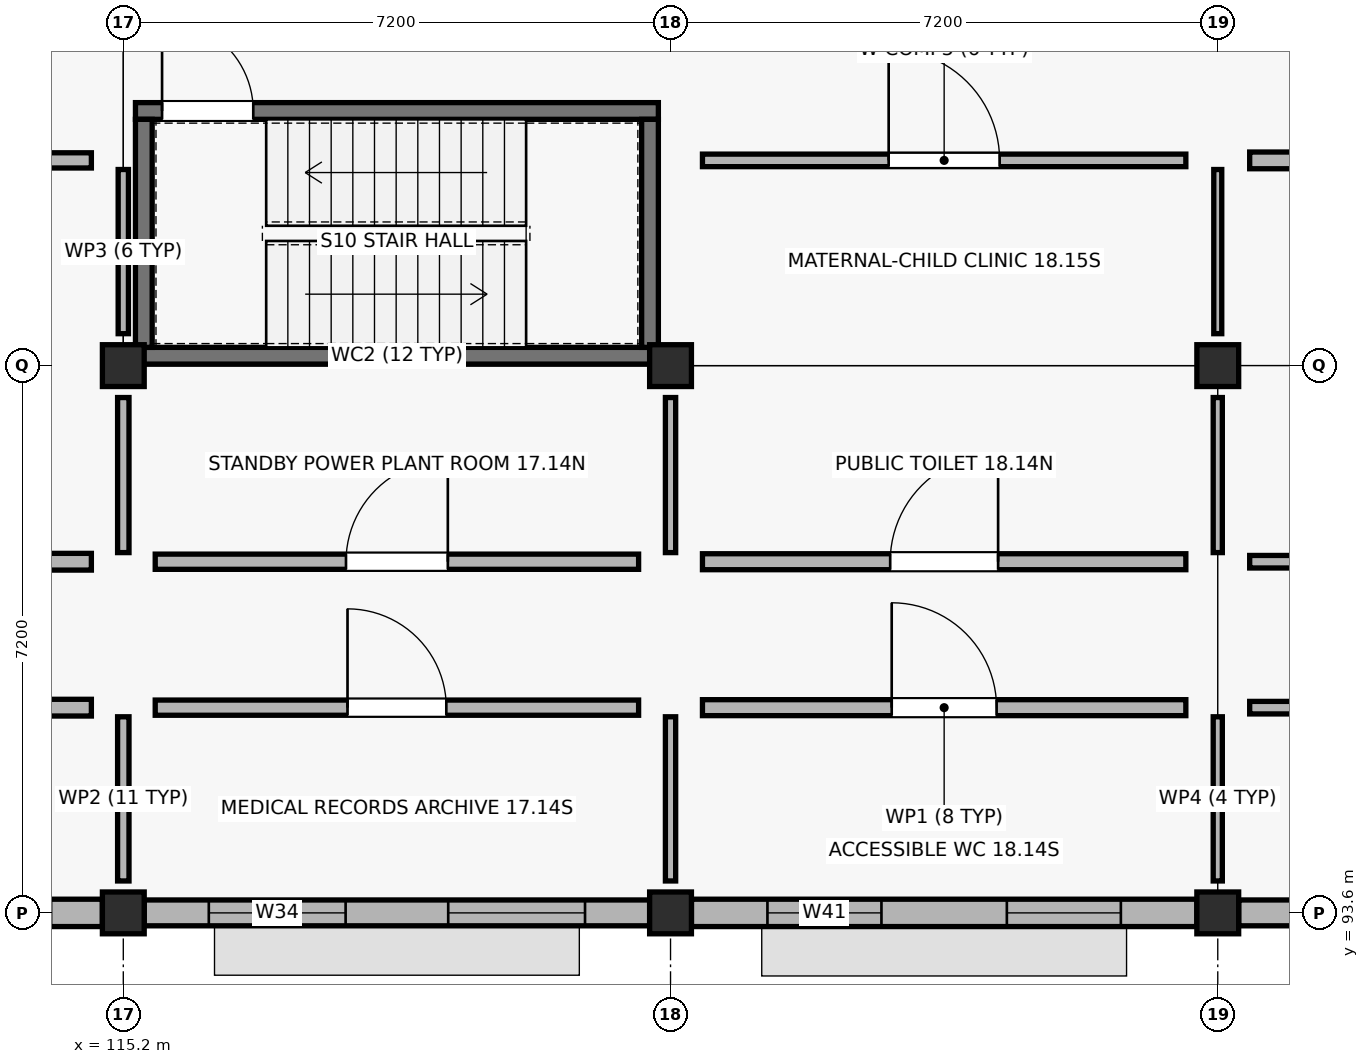
"""IFC4 building model, lengths in metres.
Left out: names, types, materials, properties, quantities, classifications, styles, units other than length and angle.
Written with IfcOpenShell. Run it as: python <this file> out.ifc"""

import sys

from ifc_helpers import new_model, si_unit, direction, frame, frame_2d, origin, origin_2d, place, context, subcontext, project, spatial, rectangle, extrude, element, fill, save


model = new_model("IFC4")
c1 = context("Model", 3, precision=1e-05, world=origin(), true_north=direction((0.0, 1.0)))
c2 = subcontext(c1, "Body", "Model", "MODEL_VIEW")
j1 = project(units=[si_unit("LENGTHUNIT", "METRE"), si_unit("PLANEANGLEUNIT", "RADIAN")], contexts=[c1])
p1 = place(None, origin())
s1 = spatial("IfcSite", under=j1, at=p1, CompositionType="ELEMENT")
p2 = place(p1, origin())
s2 = spatial("IfcBuilding", under=s1, at=p2, CompositionType="ELEMENT")
p3 = place(p2, origin())
s3 = spatial("IfcBuildingStorey", under=s2, at=p3, CompositionType="ELEMENT", Elevation=0.0)
for number, where, z_axis, x_axis in (
    (1, (115.2, 93.6, -0.25), (0.0, 0.0, 1.0), (1.0, 0.0, 0.0)),
    (2, (115.2, 100.8, -0.25), (0.0, 0.0, 1.0), (1.0, 0.0, 0.0)),
    (3, (122.4, 93.6, -0.25), (0.0, 0.0, 1.0), (1.0, 0.0, 0.0)),
    (4, (122.4, 100.8, -0.25), (0.0, 0.0, 1.0), (1.0, 0.0, 0.0)),
    (5, (129.6, 93.6, -0.25), (0.0, 0.0, 1.0), (1.0, 0.0, 0.0)),
    (6, (129.6, 100.8, -0.25), (0.0, 0.0, 1.0), (1.0, 0.0, 0.0)),
):
    element("IfcColumn", number, at=place(p3, frame(where, z_axis=z_axis, x_axis=x_axis)), inside=s3, PredefinedType="COLUMN", context=c2, shape_type="SweptSolid", body=[
        extrude(rectangle(XDim=0.55, YDim=0.55, at=origin_2d()), origin(), (0.0, 0.0, 1.0), 4.75),
    ])
p4 = place(p3, frame((108.275, 93.6, 0.0), z_axis=(0.0, 0.0, 1.0), x_axis=(1.0, 0.0, 0.0)))
e7 = element("IfcWall", 7, at=p4, inside=s3, PredefinedType="SOLIDWALL", context=c2, shape_type="SweptSolid", body=[
    extrude(rectangle(XDim=6.65, YDim=0.36, at=frame_2d((3.325, 0.0))), origin(), (0.0, 0.0, 1.0), 3.47),
])
p5 = place(p4, frame((0.675, 0.0, 0.9)))
e8 = element("IfcOpeningElement", 8, at=p5, cuts=e7, PredefinedType="OPENING", context=c2, shape_type="SweptSolid", body=[
    extrude(rectangle(XDim=2.15, YDim=1.5, at=frame_2d((1.075, 0.75))), frame((0.0, 0.19, 0.0), z_axis=(0.0, -1.0, 0.0), x_axis=(1.0, 0.0, 0.0)), (0.0, 0.0, 1.0), 0.38),
])
p6 = place(p4, frame((3.825, 0.0, 0.9)))
e9 = element("IfcOpeningElement", 9, at=p6, cuts=e7, PredefinedType="OPENING", context=c2, shape_type="SweptSolid", body=[
    extrude(rectangle(XDim=2.15, YDim=1.5, at=frame_2d((1.075, 0.75))), frame((0.0, 0.19, 0.0), z_axis=(0.0, -1.0, 0.0), x_axis=(1.0, 0.0, 0.0)), (0.0, 0.0, 1.0), 0.38),
])
p7 = place(p3, frame((115.475, 93.6, 0.0), z_axis=(0.0, 0.0, 1.0), x_axis=(1.0, 0.0, 0.0)))
e10 = element("IfcWall", 10, at=p7, inside=s3, PredefinedType="SOLIDWALL", context=c2, shape_type="SweptSolid", body=[
    extrude(rectangle(XDim=6.65, YDim=0.34, at=frame_2d((3.325, 0.0))), origin(), (0.0, 0.0, 1.0), 3.47),
])
p8 = place(p7, frame((0.85, 0.0, 0.9)))
e11 = element("IfcOpeningElement", 11, at=p8, cuts=e10, PredefinedType="OPENING", context=c2, shape_type="SweptSolid", body=[
    extrude(rectangle(XDim=1.8, YDim=1.62, at=frame_2d((0.9, 0.81))), frame((0.0, 0.18, 0.0), z_axis=(0.0, -1.0, 0.0), x_axis=(1.0, 0.0, 0.0)), (0.0, 0.0, 1.0), 0.36),
])
p9 = place(p7, frame((4.0, 0.0, 0.9)))
e12 = element("IfcOpeningElement", 12, at=p9, cuts=e10, PredefinedType="OPENING", context=c2, shape_type="SweptSolid", body=[
    extrude(rectangle(XDim=1.8, YDim=1.62, at=frame_2d((0.9, 0.81))), frame((0.0, 0.18, 0.0), z_axis=(0.0, -1.0, 0.0), x_axis=(1.0, 0.0, 0.0)), (0.0, 0.0, 1.0), 0.36),
])
p10 = place(p3, frame((122.675, 93.6, 0.0), z_axis=(0.0, 0.0, 1.0), x_axis=(1.0, 0.0, 0.0)))
e13 = element("IfcWall", 13, at=p10, inside=s3, PredefinedType="SOLIDWALL", context=c2, shape_type="SweptSolid", body=[
    extrude(rectangle(XDim=6.65, YDim=0.36, at=frame_2d((3.325, 0.0))), origin(), (0.0, 0.0, 1.0), 3.47),
])
p11 = place(p10, frame((1.0, 0.0, 0.9)))
e14 = element("IfcOpeningElement", 14, at=p11, cuts=e13, PredefinedType="OPENING", context=c2, shape_type="SweptSolid", body=[
    extrude(rectangle(XDim=1.5, YDim=1.75, at=frame_2d((0.75, 0.875))), frame((0.0, 0.19, 0.0), z_axis=(0.0, -1.0, 0.0), x_axis=(1.0, 0.0, 0.0)), (0.0, 0.0, 1.0), 0.38),
])
p12 = place(p10, frame((4.15, 0.0, 0.9)))
e15 = element("IfcOpeningElement", 15, at=p12, cuts=e13, PredefinedType="OPENING", context=c2, shape_type="SweptSolid", body=[
    extrude(rectangle(XDim=1.5, YDim=1.75, at=frame_2d((0.75, 0.875))), frame((0.0, 0.19, 0.0), z_axis=(0.0, -1.0, 0.0), x_axis=(1.0, 0.0, 0.0)), (0.0, 0.0, 1.0), 0.38),
])
p13 = place(p3, frame((129.875, 93.6, 0.0), z_axis=(0.0, 0.0, 1.0), x_axis=(1.0, 0.0, 0.0)))
e16 = element("IfcWall", 16, at=p13, inside=s3, PredefinedType="SOLIDWALL", context=c2, shape_type="SweptSolid", body=[
    extrude(rectangle(XDim=6.6, YDim=0.34, at=frame_2d((3.3, 0.0))), origin(), (0.0, 0.0, 1.0), 3.47),
])
p14 = place(p13, frame((1.3, 0.0, 0.9)))
e17 = element("IfcOpeningElement", 17, at=p14, cuts=e16, PredefinedType="OPENING", context=c2, shape_type="SweptSolid", body=[
    extrude(rectangle(XDim=0.9, YDim=1.88, at=frame_2d((0.45, 0.94))), frame((0.0, 0.18, 0.0), z_axis=(0.0, -1.0, 0.0), x_axis=(1.0, 0.0, 0.0)), (0.0, 0.0, 1.0), 0.36),
])
p15 = place(p13, frame((4.4, 0.0, 0.9)))
e18 = element("IfcOpeningElement", 18, at=p15, cuts=e16, PredefinedType="OPENING", context=c2, shape_type="SweptSolid", body=[
    extrude(rectangle(XDim=0.9, YDim=1.88, at=frame_2d((0.45, 0.94))), frame((0.0, 0.18, 0.0), z_axis=(0.0, -1.0, 0.0), x_axis=(1.0, 0.0, 0.0)), (0.0, 0.0, 1.0), 0.36),
])
p16 = place(p3, frame((115.36, 100.93, -0.25), z_axis=(0.0, 0.0, 1.0), x_axis=(1.0, 0.0, 0.0)))
e19 = element("IfcWall", 19, at=p16, inside=s3, PredefinedType="SHEAR", context=c2, shape_type="SweptSolid", body=[
    extrude(rectangle(XDim=6.88, YDim=0.22, at=frame_2d((3.44, 0.0))), origin(), (0.0, 0.0, 1.0), 4.47),
])
p17 = place(p3, frame((115.36, 104.15, -0.25), z_axis=(0.0, 0.0, 1.0), x_axis=(1.0, 0.0, 0.0)))
e20 = element("IfcWall", 20, at=p17, inside=s3, PredefinedType="SHEAR", context=c2, shape_type="SweptSolid", body=[
    extrude(rectangle(XDim=6.88, YDim=0.22, at=frame_2d((3.44, 0.0))), origin(), (0.0, 0.0, 1.0), 4.47),
])
p18 = place(p17, frame((0.35, 0.0, 0.25)))
e21 = element("IfcOpeningElement", 21, at=p18, cuts=e20, PredefinedType="OPENING", context=c2, shape_type="SweptSolid", body=[
    extrude(rectangle(XDim=1.2, YDim=2.15, at=frame_2d((0.6, 1.075))), frame((0.0, 0.12, 0.0), z_axis=(0.0, -1.0, 0.0), x_axis=(1.0, 0.0, 0.0)), (0.0, 0.0, 1.0), 0.24),
])
for number, where, z_axis, x_axis in (
    (22, (115.47, 101.04, -0.25), (0.0, 0.0, 1.0), (0.0, 1.0, 0.0)),
    (23, (122.13, 101.04, -0.25), (0.0, 0.0, 1.0), (0.0, 1.0, 0.0)),
):
    element("IfcWall", number, at=place(p3, frame(where, z_axis=z_axis, x_axis=x_axis)), inside=s3, PredefinedType="SHEAR", context=c2, shape_type="SweptSolid", body=[
        extrude(rectangle(XDim=3.0, YDim=0.22, at=frame_2d((1.5, 0.0))), origin(), (0.0, 0.0, 1.0), 4.47),
    ])
p19 = place(p3, frame((108.42, 96.3, 0.0), z_axis=(0.0, 0.0, 1.0), x_axis=(1.0, 0.0, 0.0)))
e24 = element("IfcWall", 24, at=p19, inside=s3, PredefinedType="SOLIDWALL", context=c2, shape_type="SweptSolid", body=[
    extrude(rectangle(XDim=6.36, YDim=0.22, at=frame_2d((3.18, 0.0))), origin(), (0.0, 0.0, 1.0), 3.36),
])
p20 = place(p19, frame((2.61, 0.0, 0.0)))
e25 = element("IfcOpeningElement", 25, at=p20, cuts=e24, PredefinedType="OPENING", context=c2, shape_type="SweptSolid", body=[
    extrude(rectangle(XDim=1.14, YDim=2.14, at=frame_2d((0.57, 1.07))), frame((0.0, 0.12, 0.0), z_axis=(0.0, -1.0, 0.0), x_axis=(1.0, 0.0, 0.0)), (0.0, 0.0, 1.0), 0.24),
])
p21 = place(p3, frame((115.2, 94.02, 0.0), z_axis=(0.0, 0.0, 1.0), x_axis=(0.0, 1.0, 0.0)))
e26 = element("IfcWall", 26, at=p21, inside=s3, PredefinedType="PARTITIONING", context=c2, shape_type="SweptSolid", body=[
    extrude(rectangle(XDim=2.16, YDim=0.15, at=frame_2d((1.08, 0.0))), origin(), (0.0, 0.0, 1.0), 3.36),
])
p22 = place(p3, frame((108.42, 98.22, 0.0), z_axis=(0.0, 0.0, 1.0), x_axis=(1.0, 0.0, 0.0)))
e27 = element("IfcWall", 27, at=p22, inside=s3, PredefinedType="SOLIDWALL", context=c2, shape_type="SweptSolid", body=[
    extrude(rectangle(XDim=6.36, YDim=0.22, at=frame_2d((3.18, 0.0))), origin(), (0.0, 0.0, 1.0), 3.36),
])
p23 = place(p22, frame((2.59, 0.0, 0.0)))
e28 = element("IfcOpeningElement", 28, at=p23, cuts=e27, PredefinedType="OPENING", context=c2, shape_type="SweptSolid", body=[
    extrude(rectangle(XDim=1.18, YDim=2.14, at=frame_2d((0.59, 1.07))), frame((0.0, 0.12, 0.0), z_axis=(0.0, -1.0, 0.0), x_axis=(1.0, 0.0, 0.0)), (0.0, 0.0, 1.0), 0.24),
])
p24 = place(p3, frame((115.2, 98.34, 0.0), z_axis=(0.0, 0.0, 1.0), x_axis=(0.0, 1.0, 0.0)))
e29 = element("IfcWall", 29, at=p24, inside=s3, PredefinedType="PARTITIONING", context=c2, shape_type="SweptSolid", body=[
    extrude(rectangle(XDim=2.04, YDim=0.15, at=frame_2d((1.02, 0.0))), origin(), (0.0, 0.0, 1.0), 3.36),
])
p25 = place(p3, frame((108.42, 103.5, 0.0), z_axis=(0.0, 0.0, 1.0), x_axis=(1.0, 0.0, 0.0)))
e30 = element("IfcWall", 30, at=p25, inside=s3, PredefinedType="SOLIDWALL", context=c2, shape_type="SweptSolid", body=[
    extrude(rectangle(XDim=6.36, YDim=0.2, at=frame_2d((3.18, 0.0))), origin(), (0.0, 0.0, 1.0), 3.36),
])
p26 = place(p25, frame((2.57, 0.0, 0.0)))
e31 = element("IfcOpeningElement", 31, at=p26, cuts=e30, PredefinedType="OPENING", context=c2, shape_type="SweptSolid", body=[
    extrude(rectangle(XDim=1.22, YDim=2.14, at=frame_2d((0.61, 1.07))), frame((0.0, 0.11, 0.0), z_axis=(0.0, -1.0, 0.0), x_axis=(1.0, 0.0, 0.0)), (0.0, 0.0, 1.0), 0.22),
])
p27 = place(p3, frame((115.2, 101.22, 0.0), z_axis=(0.0, 0.0, 1.0), x_axis=(0.0, 1.0, 0.0)))
e32 = element("IfcWall", 32, at=p27, inside=s3, PredefinedType="PARTITIONING", context=c2, shape_type="SweptSolid", body=[
    extrude(rectangle(XDim=2.16, YDim=0.135, at=frame_2d((1.08, 0.0))), origin(), (0.0, 0.0, 1.0), 3.36),
])
p28 = place(p3, frame((115.62, 96.3, 0.0), z_axis=(0.0, 0.0, 1.0), x_axis=(1.0, 0.0, 0.0)))
e33 = element("IfcWall", 33, at=p28, inside=s3, PredefinedType="SOLIDWALL", context=c2, shape_type="SweptSolid", body=[
    extrude(rectangle(XDim=6.36, YDim=0.2, at=frame_2d((3.18, 0.0))), origin(), (0.0, 0.0, 1.0), 3.36),
])
p29 = place(p28, frame((2.53, 0.0, 0.0)))
e34 = element("IfcOpeningElement", 34, at=p29, cuts=e33, PredefinedType="OPENING", context=c2, shape_type="SweptSolid", body=[
    extrude(rectangle(XDim=1.3, YDim=2.14, at=frame_2d((0.65, 1.07))), frame((0.0, 0.11, 0.0), z_axis=(0.0, -1.0, 0.0), x_axis=(1.0, 0.0, 0.0)), (0.0, 0.0, 1.0), 0.22),
])
p30 = place(p3, frame((122.4, 94.02, 0.0), z_axis=(0.0, 0.0, 1.0), x_axis=(0.0, 1.0, 0.0)))
e35 = element("IfcWall", 35, at=p30, inside=s3, PredefinedType="PARTITIONING", context=c2, shape_type="SweptSolid", body=[
    extrude(rectangle(XDim=2.16, YDim=0.135, at=frame_2d((1.08, 0.0))), origin(), (0.0, 0.0, 1.0), 3.36),
])
p31 = place(p3, frame((115.62, 98.22, 0.0), z_axis=(0.0, 0.0, 1.0), x_axis=(1.0, 0.0, 0.0)))
e36 = element("IfcWall", 36, at=p31, inside=s3, PredefinedType="SOLIDWALL", context=c2, shape_type="SweptSolid", body=[
    extrude(rectangle(XDim=6.36, YDim=0.2, at=frame_2d((3.18, 0.0))), origin(), (0.0, 0.0, 1.0), 3.36),
])
p32 = place(p31, frame((2.51, 0.0, 0.0)))
e37 = element("IfcOpeningElement", 37, at=p32, cuts=e36, PredefinedType="OPENING", context=c2, shape_type="SweptSolid", body=[
    extrude(rectangle(XDim=1.34, YDim=2.14, at=frame_2d((0.67, 1.07))), frame((0.0, 0.11, 0.0), z_axis=(0.0, -1.0, 0.0), x_axis=(1.0, 0.0, 0.0)), (0.0, 0.0, 1.0), 0.22),
])
p33 = place(p3, frame((122.4, 98.34, 0.0), z_axis=(0.0, 0.0, 1.0), x_axis=(0.0, 1.0, 0.0)))
e38 = element("IfcWall", 38, at=p33, inside=s3, PredefinedType="PARTITIONING", context=c2, shape_type="SweptSolid", body=[
    extrude(rectangle(XDim=2.04, YDim=0.135, at=frame_2d((1.02, 0.0))), origin(), (0.0, 0.0, 1.0), 3.36),
])
p34 = place(p3, frame((122.82, 96.3, 0.0), z_axis=(0.0, 0.0, 1.0), x_axis=(1.0, 0.0, 0.0)))
e39 = element("IfcWall", 39, at=p34, inside=s3, PredefinedType="PLUMBINGWALL", context=c2, shape_type="SweptSolid", body=[
    extrude(rectangle(XDim=6.36, YDim=0.21, at=frame_2d((3.18, 0.0))), origin(), (0.0, 0.0, 1.0), 3.36),
])
p35 = place(p34, frame((2.49, 0.0, 0.0)))
e40 = element("IfcOpeningElement", 40, at=p35, cuts=e39, PredefinedType="OPENING", context=c2, shape_type="SweptSolid", body=[
    extrude(rectangle(XDim=1.38, YDim=2.14, at=frame_2d((0.69, 1.07))), frame((0.0, 0.115, 0.0), z_axis=(0.0, -1.0, 0.0), x_axis=(1.0, 0.0, 0.0)), (0.0, 0.0, 1.0), 0.23),
])
p36 = place(p3, frame((129.6, 94.02, 0.0), z_axis=(0.0, 0.0, 1.0), x_axis=(0.0, 1.0, 0.0)))
e41 = element("IfcWall", 41, at=p36, inside=s3, PredefinedType="PARTITIONING", context=c2, shape_type="SweptSolid", body=[
    extrude(rectangle(XDim=2.16, YDim=0.12, at=frame_2d((1.08, 0.0))), origin(), (0.0, 0.0, 1.0), 3.36),
])
p37 = place(p3, frame((122.82, 98.22, 0.0), z_axis=(0.0, 0.0, 1.0), x_axis=(1.0, 0.0, 0.0)))
e42 = element("IfcWall", 42, at=p37, inside=s3, PredefinedType="PLUMBINGWALL", context=c2, shape_type="SweptSolid", body=[
    extrude(rectangle(XDim=6.36, YDim=0.21, at=frame_2d((3.18, 0.0))), origin(), (0.0, 0.0, 1.0), 3.36),
])
p38 = place(p37, frame((2.47, 0.0, 0.0)))
e43 = element("IfcOpeningElement", 43, at=p38, cuts=e42, PredefinedType="OPENING", context=c2, shape_type="SweptSolid", body=[
    extrude(rectangle(XDim=1.42, YDim=2.14, at=frame_2d((0.71, 1.07))), frame((0.0, 0.115, 0.0), z_axis=(0.0, -1.0, 0.0), x_axis=(1.0, 0.0, 0.0)), (0.0, 0.0, 1.0), 0.23),
])
p39 = place(p3, frame((129.6, 98.34, 0.0), z_axis=(0.0, 0.0, 1.0), x_axis=(0.0, 1.0, 0.0)))
e44 = element("IfcWall", 44, at=p39, inside=s3, PredefinedType="PARTITIONING", context=c2, shape_type="SweptSolid", body=[
    extrude(rectangle(XDim=2.04, YDim=0.12, at=frame_2d((1.02, 0.0))), origin(), (0.0, 0.0, 1.0), 3.36),
])
p40 = place(p3, frame((122.82, 103.5, 0.0), z_axis=(0.0, 0.0, 1.0), x_axis=(1.0, 0.0, 0.0)))
e45 = element("IfcWall", 45, at=p40, inside=s3, PredefinedType="PARTITIONING", context=c2, shape_type="SweptSolid", body=[
    extrude(rectangle(XDim=6.36, YDim=0.165, at=frame_2d((3.18, 0.0))), origin(), (0.0, 0.0, 1.0), 3.36),
])
p41 = place(p40, frame((2.45, 0.0, 0.0)))
e46 = element("IfcOpeningElement", 46, at=p41, cuts=e45, PredefinedType="OPENING", context=c2, shape_type="SweptSolid", body=[
    extrude(rectangle(XDim=1.46, YDim=2.14, at=frame_2d((0.73, 1.07))), frame((0.0, 0.093, 0.0), z_axis=(0.0, -1.0, 0.0), x_axis=(1.0, 0.0, 0.0)), (0.0, 0.0, 1.0), 0.185),
])
p42 = place(p3, frame((129.6, 101.22, 0.0), z_axis=(0.0, 0.0, 1.0), x_axis=(0.0, 1.0, 0.0)))
e47 = element("IfcWall", 47, at=p42, inside=s3, PredefinedType="PARTITIONING", context=c2, shape_type="SweptSolid", body=[
    extrude(rectangle(XDim=2.16, YDim=0.105, at=frame_2d((1.08, 0.0))), origin(), (0.0, 0.0, 1.0), 3.36),
])
p43 = place(p3, frame((130.02, 96.3, 0.0), z_axis=(0.0, 0.0, 1.0), x_axis=(1.0, 0.0, 0.0)))
e48 = element("IfcWall", 48, at=p43, inside=s3, PredefinedType="PARTITIONING", context=c2, shape_type="SweptSolid", body=[
    extrude(rectangle(XDim=6.36, YDim=0.165, at=frame_2d((3.18, 0.0))), origin(), (0.0, 0.0, 1.0), 3.36),
])
p44 = place(p43, frame((2.43, 0.0, 0.0)))
e49 = element("IfcOpeningElement", 49, at=p44, cuts=e48, PredefinedType="OPENING", context=c2, shape_type="SweptSolid", body=[
    extrude(rectangle(XDim=1.5, YDim=2.14, at=frame_2d((0.75, 1.07))), frame((0.0, 0.093, 0.0), z_axis=(0.0, -1.0, 0.0), x_axis=(1.0, 0.0, 0.0)), (0.0, 0.0, 1.0), 0.185),
])
p45 = place(p3, frame((130.02, 98.22, 0.0), z_axis=(0.0, 0.0, 1.0), x_axis=(1.0, 0.0, 0.0)))
e50 = element("IfcWall", 50, at=p45, inside=s3, PredefinedType="PARTITIONING", context=c2, shape_type="SweptSolid", body=[
    extrude(rectangle(XDim=6.36, YDim=0.165, at=frame_2d((3.18, 0.0))), origin(), (0.0, 0.0, 1.0), 3.36),
])
p46 = place(p45, frame((2.73, 0.0, 0.0)))
e51 = element("IfcOpeningElement", 51, at=p46, cuts=e50, PredefinedType="OPENING", context=c2, shape_type="SweptSolid", body=[
    extrude(rectangle(XDim=0.9, YDim=2.19, at=frame_2d((0.45, 1.095))), frame((0.0, 0.093, 0.0), z_axis=(0.0, -1.0, 0.0), x_axis=(1.0, 0.0, 0.0)), (0.0, 0.0, 1.0), 0.185),
])
p47 = place(p3, frame((130.02, 103.5, 0.0), z_axis=(0.0, 0.0, 1.0), x_axis=(1.0, 0.0, 0.0)))
e52 = element("IfcWall", 52, at=p47, inside=s3, PredefinedType="SOLIDWALL", context=c2, shape_type="SweptSolid", body=[
    extrude(rectangle(XDim=6.36, YDim=0.22, at=frame_2d((3.18, 0.0))), origin(), (0.0, 0.0, 1.0), 3.36),
])
p48 = place(p47, frame((2.71, 0.0, 0.0)))
e53 = element("IfcOpeningElement", 53, at=p48, cuts=e52, PredefinedType="OPENING", context=c2, shape_type="SweptSolid", body=[
    extrude(rectangle(XDim=0.94, YDim=2.19, at=frame_2d((0.47, 1.095))), frame((0.0, 0.12, 0.0), z_axis=(0.0, -1.0, 0.0), x_axis=(1.0, 0.0, 0.0)), (0.0, 0.0, 1.0), 0.24),
])
p49 = place(p8, origin())
e54 = element("IfcWindow", 54, at=p49, inside=s3, PartitioningType="SINGLE_PANEL", PredefinedType="WINDOW", context=c2, shape_type="SweptSolid", body=[
    extrude(rectangle(XDim=1.8, YDim=1.62, at=frame_2d((0.9, 0.81))), frame((0.0, 0.03, 0.0), z_axis=(0.0, -1.0, 0.0), x_axis=(1.0, 0.0, 0.0)), (0.0, 0.0, 1.0), 0.06),
])
fill(e11, e54)
p50 = place(p9, origin())
e55 = element("IfcWindow", 55, at=p50, inside=s3, PartitioningType="SINGLE_PANEL", PredefinedType="WINDOW", context=c2, shape_type="SweptSolid", body=[
    extrude(rectangle(XDim=1.8, YDim=1.62, at=frame_2d((0.9, 0.81))), frame((0.0, 0.03, 0.0), z_axis=(0.0, -1.0, 0.0), x_axis=(1.0, 0.0, 0.0)), (0.0, 0.0, 1.0), 0.06),
])
fill(e12, e55)
p51 = place(p11, origin())
e56 = element("IfcWindow", 56, at=p51, inside=s3, PartitioningType="SINGLE_PANEL", PredefinedType="WINDOW", context=c2, shape_type="SweptSolid", body=[
    extrude(rectangle(XDim=1.5, YDim=1.75, at=frame_2d((0.75, 0.875))), frame((0.0, 0.03, 0.0), z_axis=(0.0, -1.0, 0.0), x_axis=(1.0, 0.0, 0.0)), (0.0, 0.0, 1.0), 0.06),
])
fill(e14, e56)
p52 = place(p12, origin())
e57 = element("IfcWindow", 57, at=p52, inside=s3, PartitioningType="SINGLE_PANEL", PredefinedType="WINDOW", context=c2, shape_type="SweptSolid", body=[
    extrude(rectangle(XDim=1.5, YDim=1.75, at=frame_2d((0.75, 0.875))), frame((0.0, 0.03, 0.0), z_axis=(0.0, -1.0, 0.0), x_axis=(1.0, 0.0, 0.0)), (0.0, 0.0, 1.0), 0.06),
])
fill(e15, e57)
p53 = place(p18, origin())
e58 = element("IfcDoor", 58, at=p53, inside=s3, OperationType="SINGLE_SWING_LEFT", PredefinedType="DOOR", context=c2, shape_type="SweptSolid", body=[
    extrude(rectangle(XDim=1.2, YDim=2.15, at=frame_2d((0.6, 1.075))), frame((0.0, 0.025, 0.0), z_axis=(0.0, -1.0, 0.0), x_axis=(1.0, 0.0, 0.0)), (0.0, 0.0, 1.0), 0.05),
])
fill(e21, e58)
p54 = place(p29, origin())
e59 = element("IfcDoor", 59, at=p54, inside=s3, OperationType="SINGLE_SWING_LEFT", PredefinedType="DOOR", context=c2, shape_type="SweptSolid", body=[
    extrude(rectangle(XDim=1.3, YDim=2.14, at=frame_2d((0.65, 1.07))), frame((0.0, 0.025, 0.0), z_axis=(0.0, -1.0, 0.0), x_axis=(1.0, 0.0, 0.0)), (0.0, 0.0, 1.0), 0.05),
])
fill(e34, e59)
p55 = place(p32, origin())
e60 = element("IfcDoor", 60, at=p55, inside=s3, OperationType="SINGLE_SWING_RIGHT", PredefinedType="DOOR", context=c2, shape_type="SweptSolid", body=[
    extrude(rectangle(XDim=1.34, YDim=2.14, at=frame_2d((0.67, 1.07))), frame((0.0, 0.025, 0.0), z_axis=(0.0, -1.0, 0.0), x_axis=(1.0, 0.0, 0.0)), (0.0, 0.0, 1.0), 0.05),
])
fill(e37, e60)
p56 = place(p35, origin())
e61 = element("IfcDoor", 61, at=p56, inside=s3, OperationType="SINGLE_SWING_LEFT", PredefinedType="DOOR", context=c2, shape_type="SweptSolid", body=[
    extrude(rectangle(XDim=1.38, YDim=2.14, at=frame_2d((0.69, 1.07))), frame((0.0, 0.025, 0.0), z_axis=(0.0, -1.0, 0.0), x_axis=(1.0, 0.0, 0.0)), (0.0, 0.0, 1.0), 0.05),
])
fill(e40, e61)
p57 = place(p38, origin())
e62 = element("IfcDoor", 62, at=p57, inside=s3, OperationType="SINGLE_SWING_RIGHT", PredefinedType="DOOR", context=c2, shape_type="SweptSolid", body=[
    extrude(rectangle(XDim=1.42, YDim=2.14, at=frame_2d((0.71, 1.07))), frame((0.0, 0.025, 0.0), z_axis=(0.0, -1.0, 0.0), x_axis=(1.0, 0.0, 0.0)), (0.0, 0.0, 1.0), 0.05),
])
fill(e43, e62)
p58 = place(p41, origin())
e63 = element("IfcDoor", 63, at=p58, inside=s3, OperationType="SINGLE_SWING_LEFT", PredefinedType="DOOR", context=c2, shape_type="SweptSolid", body=[
    extrude(rectangle(XDim=1.46, YDim=2.14, at=frame_2d((0.73, 1.07))), frame((0.0, 0.025, 0.0), z_axis=(0.0, -1.0, 0.0), x_axis=(1.0, 0.0, 0.0)), (0.0, 0.0, 1.0), 0.05),
])
fill(e46, e63)
save(model, sys.argv[1])
